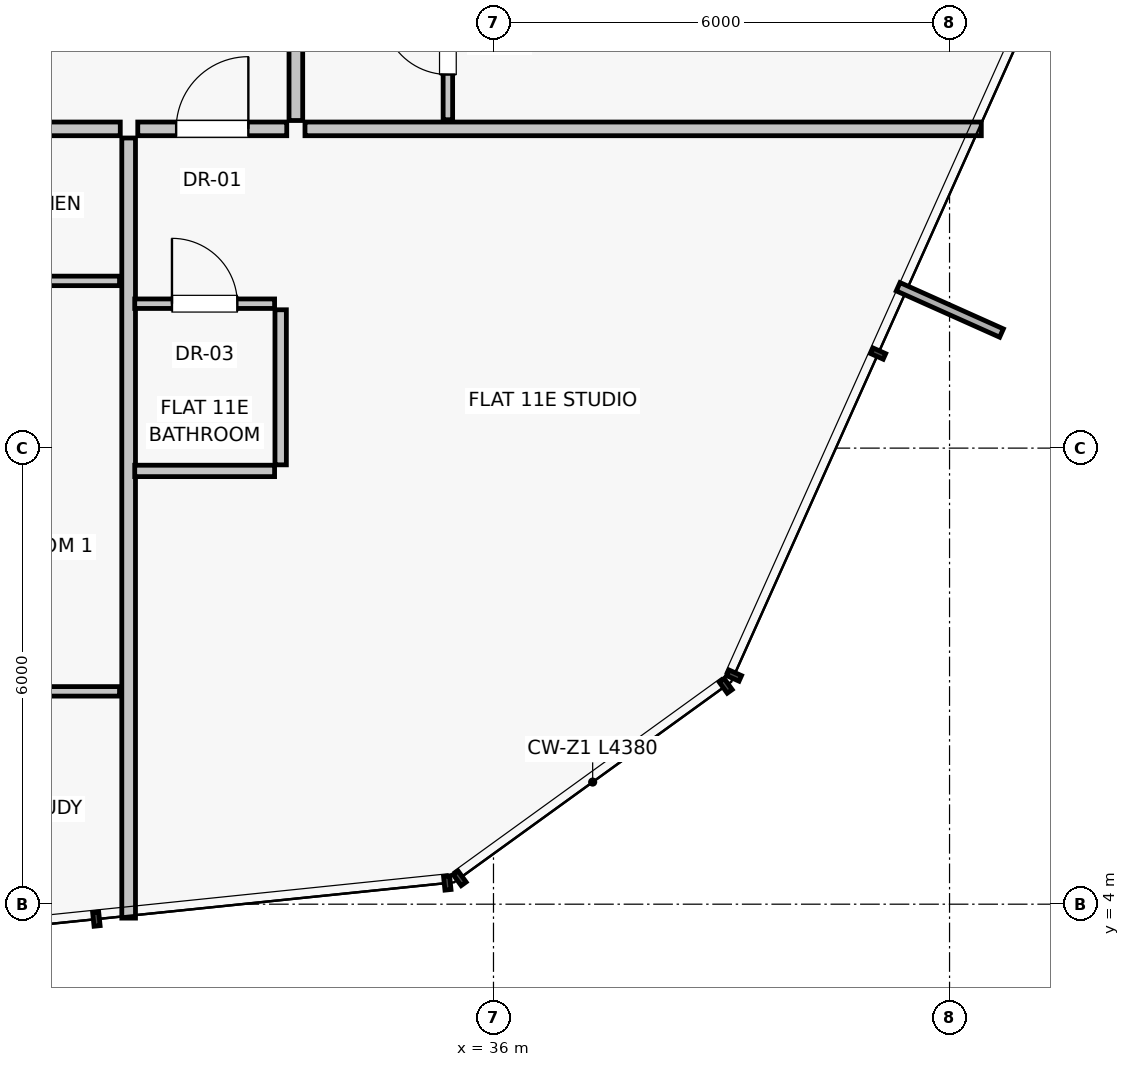
"""IFC4 building model, lengths in metres.
Left out: names, types, materials, properties, quantities, classifications, styles, units other than length and angle.
Written with IfcOpenShell. Run it as: python <this file> out.ifc"""

import sys

from ifc_helpers import new_model, si_unit, direction, frame, frame_2d, origin, place, context, subcontext, project, spatial, rectangle, extrude, source, transform, mapped, element, fill, save


model = new_model("IFC4")
c1 = context("Model", 3, precision=1e-05, world=origin(), true_north=direction((0.0, 1.0)))
c2 = subcontext(c1, "Body", "Model", "MODEL_VIEW")
j1 = project(units=[si_unit("LENGTHUNIT", "METRE"), si_unit("PLANEANGLEUNIT", "RADIAN")], contexts=[c1])
p1 = place(None, origin())
s1 = spatial("IfcSite", under=j1, at=p1, CompositionType="ELEMENT")
p2 = place(p1, origin())
s2 = spatial("IfcBuilding", under=s1, at=p2, CompositionType="ELEMENT")
p3 = place(p2, frame((0.0, 0.0, 43.55)))
s3 = spatial("IfcBuildingStorey", under=s2, at=p3, CompositionType="ELEMENT", Elevation=43.55)
p4 = place(p3, frame((31.2, 14.08, 0.0), z_axis=(0.0, 0.0, 1.0), x_axis=(0.0, -1.0, 0.0)))
e1 = element("IfcWall", 1, at=p4, inside=s3, PredefinedType="PARTITIONING", context=c2, shape_type="SweptSolid", body=[
    extrude(rectangle(XDim=10.263, YDim=0.18, at=frame_2d((5.132, 0.0))), origin(), (0.0, 0.0, 1.0), 3.0),
])
p5 = place(p3, frame((21.23, 14.2, 0.0), z_axis=(0.0, 0.0, 1.0), x_axis=(1.0, 0.0, 0.0)))
e2 = element("IfcWall", 2, at=p5, inside=s3, PredefinedType="PARTITIONING", context=c2, shape_type="SweptSolid", body=[
    extrude(rectangle(XDim=9.86, YDim=0.18, at=frame_2d((4.93, 0.0))), origin(), (0.0, 0.0, 1.0), 3.0),
])
p6 = place(p5, frame((3.276, 0.0, 0.0)))
e3 = element("IfcOpeningElement", 3, at=p6, cuts=e2, PredefinedType="OPENING", context=c2, shape_type="SweptSolid", body=[
    extrude(rectangle(XDim=0.95, YDim=2.02, at=frame_2d((0.475, 1.01))), frame((0.0, 0.1, 0.0), z_axis=(0.0, -1.0, 0.0), x_axis=(1.0, 0.0, 0.0)), (0.0, 0.0, 1.0), 0.2),
])
p7 = place(p3, frame((26.692, 6.8, 0.0), z_axis=(0.0, 0.0, 1.0), x_axis=(1.0, 0.0, 0.0)))
e4 = element("IfcWall", 4, at=p7, inside=s3, PredefinedType="PARTITIONING", context=c2, shape_type="SweptSolid", body=[
    extrude(rectangle(XDim=4.388, YDim=0.125, at=frame_2d((2.194, 0.0))), origin(), (0.0, 0.0, 1.0), 2.1),
])
p8 = place(p3, frame((26.692, 12.2, 0.0), z_axis=(0.0, 0.0, 1.0), x_axis=(1.0, 0.0, 0.0)))
e5 = element("IfcWall", 5, at=p8, inside=s3, PredefinedType="PARTITIONING", context=c2, shape_type="SweptSolid", body=[
    extrude(rectangle(XDim=4.388, YDim=0.125, at=frame_2d((2.194, 0.0))), origin(), (0.0, 0.0, 1.0), 3.0),
])
p9 = place(p3, frame((33.52, 14.2, 0.0), z_axis=(0.0, 0.0, 1.0), x_axis=(1.0, 0.0, 0.0)))
e6 = element("IfcWall", 6, at=p9, inside=s3, PredefinedType="PARTITIONING", context=c2, shape_type="SweptSolid", body=[
    extrude(rectangle(XDim=8.898, YDim=0.18, at=frame_2d((4.449, 0.0))), origin(), (0.0, 0.0, 1.0), 3.0),
])
p10 = place(p3, frame((33.4, 14.31, 0.0), z_axis=(0.0, 0.0, 1.0), x_axis=(0.0, 1.0, 0.0)))
e7 = element("IfcWall", 7, at=p10, inside=s3, PredefinedType="PARTITIONING", context=c2, shape_type="SweptSolid", body=[
    extrude(rectangle(XDim=12.108, YDim=0.18, at=frame_2d((6.054, 0.0))), origin(), (0.0, 0.0, 1.0), 3.0),
])
p11 = place(p10, frame((3.93, 0.0, 0.0)))
e8 = element("IfcOpeningElement", 8, at=p11, cuts=e7, PredefinedType="OPENING", context=c2, shape_type="SweptSolid", body=[
    extrude(rectangle(XDim=0.95, YDim=2.02, at=frame_2d((0.475, 1.01))), frame((0.0, 0.1, 0.0), z_axis=(0.0, -1.0, 0.0), x_axis=(1.0, 0.0, 0.0)), (0.0, 0.0, 1.0), 0.2),
])
p12 = place(p3, frame((35.4, 14.32, 0.0), z_axis=(0.0, 0.0, 1.0), x_axis=(0.0, 1.0, 0.0)))
e9 = element("IfcWall", 9, at=p12, inside=s3, PredefinedType="PARTITIONING", context=c2, shape_type="SweptSolid", body=[
    extrude(rectangle(XDim=2.05, YDim=0.125, at=frame_2d((1.025, 0.0))), origin(), (0.0, 0.0, 1.0), 3.0),
])
p13 = place(p12, frame((0.595, 0.0, 0.0)))
e10 = element("IfcOpeningElement", 10, at=p13, cuts=e9, PredefinedType="OPENING", context=c2, shape_type="SweptSolid", body=[
    extrude(rectangle(XDim=0.86, YDim=2.01, at=frame_2d((0.43, 1.005))), frame((0.0, 0.073, 0.0), z_axis=(0.0, -1.0, 0.0), x_axis=(1.0, 0.0, 0.0)), (0.0, 0.0, 1.0), 0.145),
])
p14 = place(p3, frame((31.32, 14.2, 0.0), z_axis=(0.0, 0.0, 1.0), x_axis=(1.0, 0.0, 0.0)))
e11 = element("IfcWall", 11, at=p14, inside=s3, PredefinedType="PARTITIONING", context=c2, shape_type="SweptSolid", body=[
    extrude(rectangle(XDim=1.96, YDim=0.18, at=frame_2d((0.98, 0.0))), origin(), (0.0, 0.0, 1.0), 3.0),
])
p15 = place(p14, frame((0.505, 0.0, 0.0)))
e12 = element("IfcOpeningElement", 12, at=p15, cuts=e11, PredefinedType="OPENING", context=c2, shape_type="SweptSolid", body=[
    extrude(rectangle(XDim=0.95, YDim=2.02, at=frame_2d((0.475, 1.01))), frame((0.0, 0.1, 0.0), z_axis=(0.0, -1.0, 0.0), x_axis=(1.0, 0.0, 0.0)), (0.0, 0.0, 1.0), 0.2),
])
p16 = place(p3, frame((31.28, 11.9, 0.0), z_axis=(0.0, 0.0, 1.0), x_axis=(1.0, 0.0, 0.0)))
e13 = element("IfcWall", 13, at=p16, inside=s3, PredefinedType="PARTITIONING", context=c2, shape_type="SweptSolid", body=[
    extrude(rectangle(XDim=1.84, YDim=0.125, at=frame_2d((0.92, 0.0))), origin(), (0.0, 0.0, 1.0), 3.0),
])
p17 = place(p16, frame((0.49, 0.0, 0.0)))
e14 = element("IfcOpeningElement", 14, at=p17, cuts=e13, PredefinedType="OPENING", context=c2, shape_type="SweptSolid", body=[
    extrude(rectangle(XDim=0.86, YDim=2.01, at=frame_2d((0.43, 1.005))), frame((0.0, 0.073, 0.0), z_axis=(0.0, -1.0, 0.0), x_axis=(1.0, 0.0, 0.0)), (0.0, 0.0, 1.0), 0.145),
])
p18 = place(p3, frame((31.28, 9.7, 0.0), z_axis=(0.0, 0.0, 1.0), x_axis=(1.0, 0.0, 0.0)))
e15 = element("IfcWall", 15, at=p18, inside=s3, PredefinedType="PARTITIONING", context=c2, shape_type="SweptSolid", body=[
    extrude(rectangle(XDim=1.84, YDim=0.15, at=frame_2d((0.92, 0.0))), origin(), (0.0, 0.0, 1.0), 3.0),
])
p19 = place(p3, frame((33.2, 9.78, 0.0), z_axis=(0.0, 0.0, 1.0), x_axis=(0.0, 1.0, 0.0)))
e16 = element("IfcWall", 16, at=p19, inside=s3, PredefinedType="PARTITIONING", context=c2, shape_type="SweptSolid", body=[
    extrude(rectangle(XDim=2.04, YDim=0.15, at=frame_2d((1.02, 0.0))), origin(), (0.0, 0.0, 1.0), 3.0),
])
m1 = source(origin(), c2, "Body", "SweptSolid", [
    extrude(rectangle(XDim=0.86, YDim=2.01, at=frame_2d((0.43, 1.005))), frame((0.0, 0.025, 0.0), z_axis=(0.0, -1.0, 0.0), x_axis=(1.0, 0.0, 0.0)), (0.0, 0.0, 1.0), 0.05),
])
p20 = place(p13, origin())
e17 = element("IfcDoor", 17, at=p20, inside=s3, OperationType="SINGLE_SWING_RIGHT", PredefinedType="DOOR", context=c2, shape_type="MappedRepresentation", body=[
    mapped(m1, transform((0.0, 0.0, 0.0), scale=1.0)),
])
fill(e10, e17)
m2 = source(origin(), c2, "Body", "SweptSolid", [
    extrude(rectangle(XDim=0.95, YDim=2.02, at=frame_2d((0.475, 1.01))), frame((0.0, 0.025, 0.0), z_axis=(0.0, -1.0, 0.0), x_axis=(1.0, 0.0, 0.0)), (0.0, 0.0, 1.0), 0.05),
])
p21 = place(p15, origin())
e18 = element("IfcDoor", 18, at=p21, inside=s3, OperationType="SINGLE_SWING_RIGHT", PredefinedType="DOOR", context=c2, shape_type="MappedRepresentation", body=[
    mapped(m2, transform((0.0, 0.0, 0.0), scale=1.0)),
])
fill(e12, e18)
p22 = place(p17, origin())
e19 = element("IfcDoor", 19, at=p22, inside=s3, OperationType="SINGLE_SWING_LEFT", PredefinedType="DOOR", context=c2, shape_type="MappedRepresentation", body=[
    mapped(m1, transform((0.0, 0.0, 0.0), scale=1.0)),
])
fill(e14, e19)
save(model, sys.argv[1])
